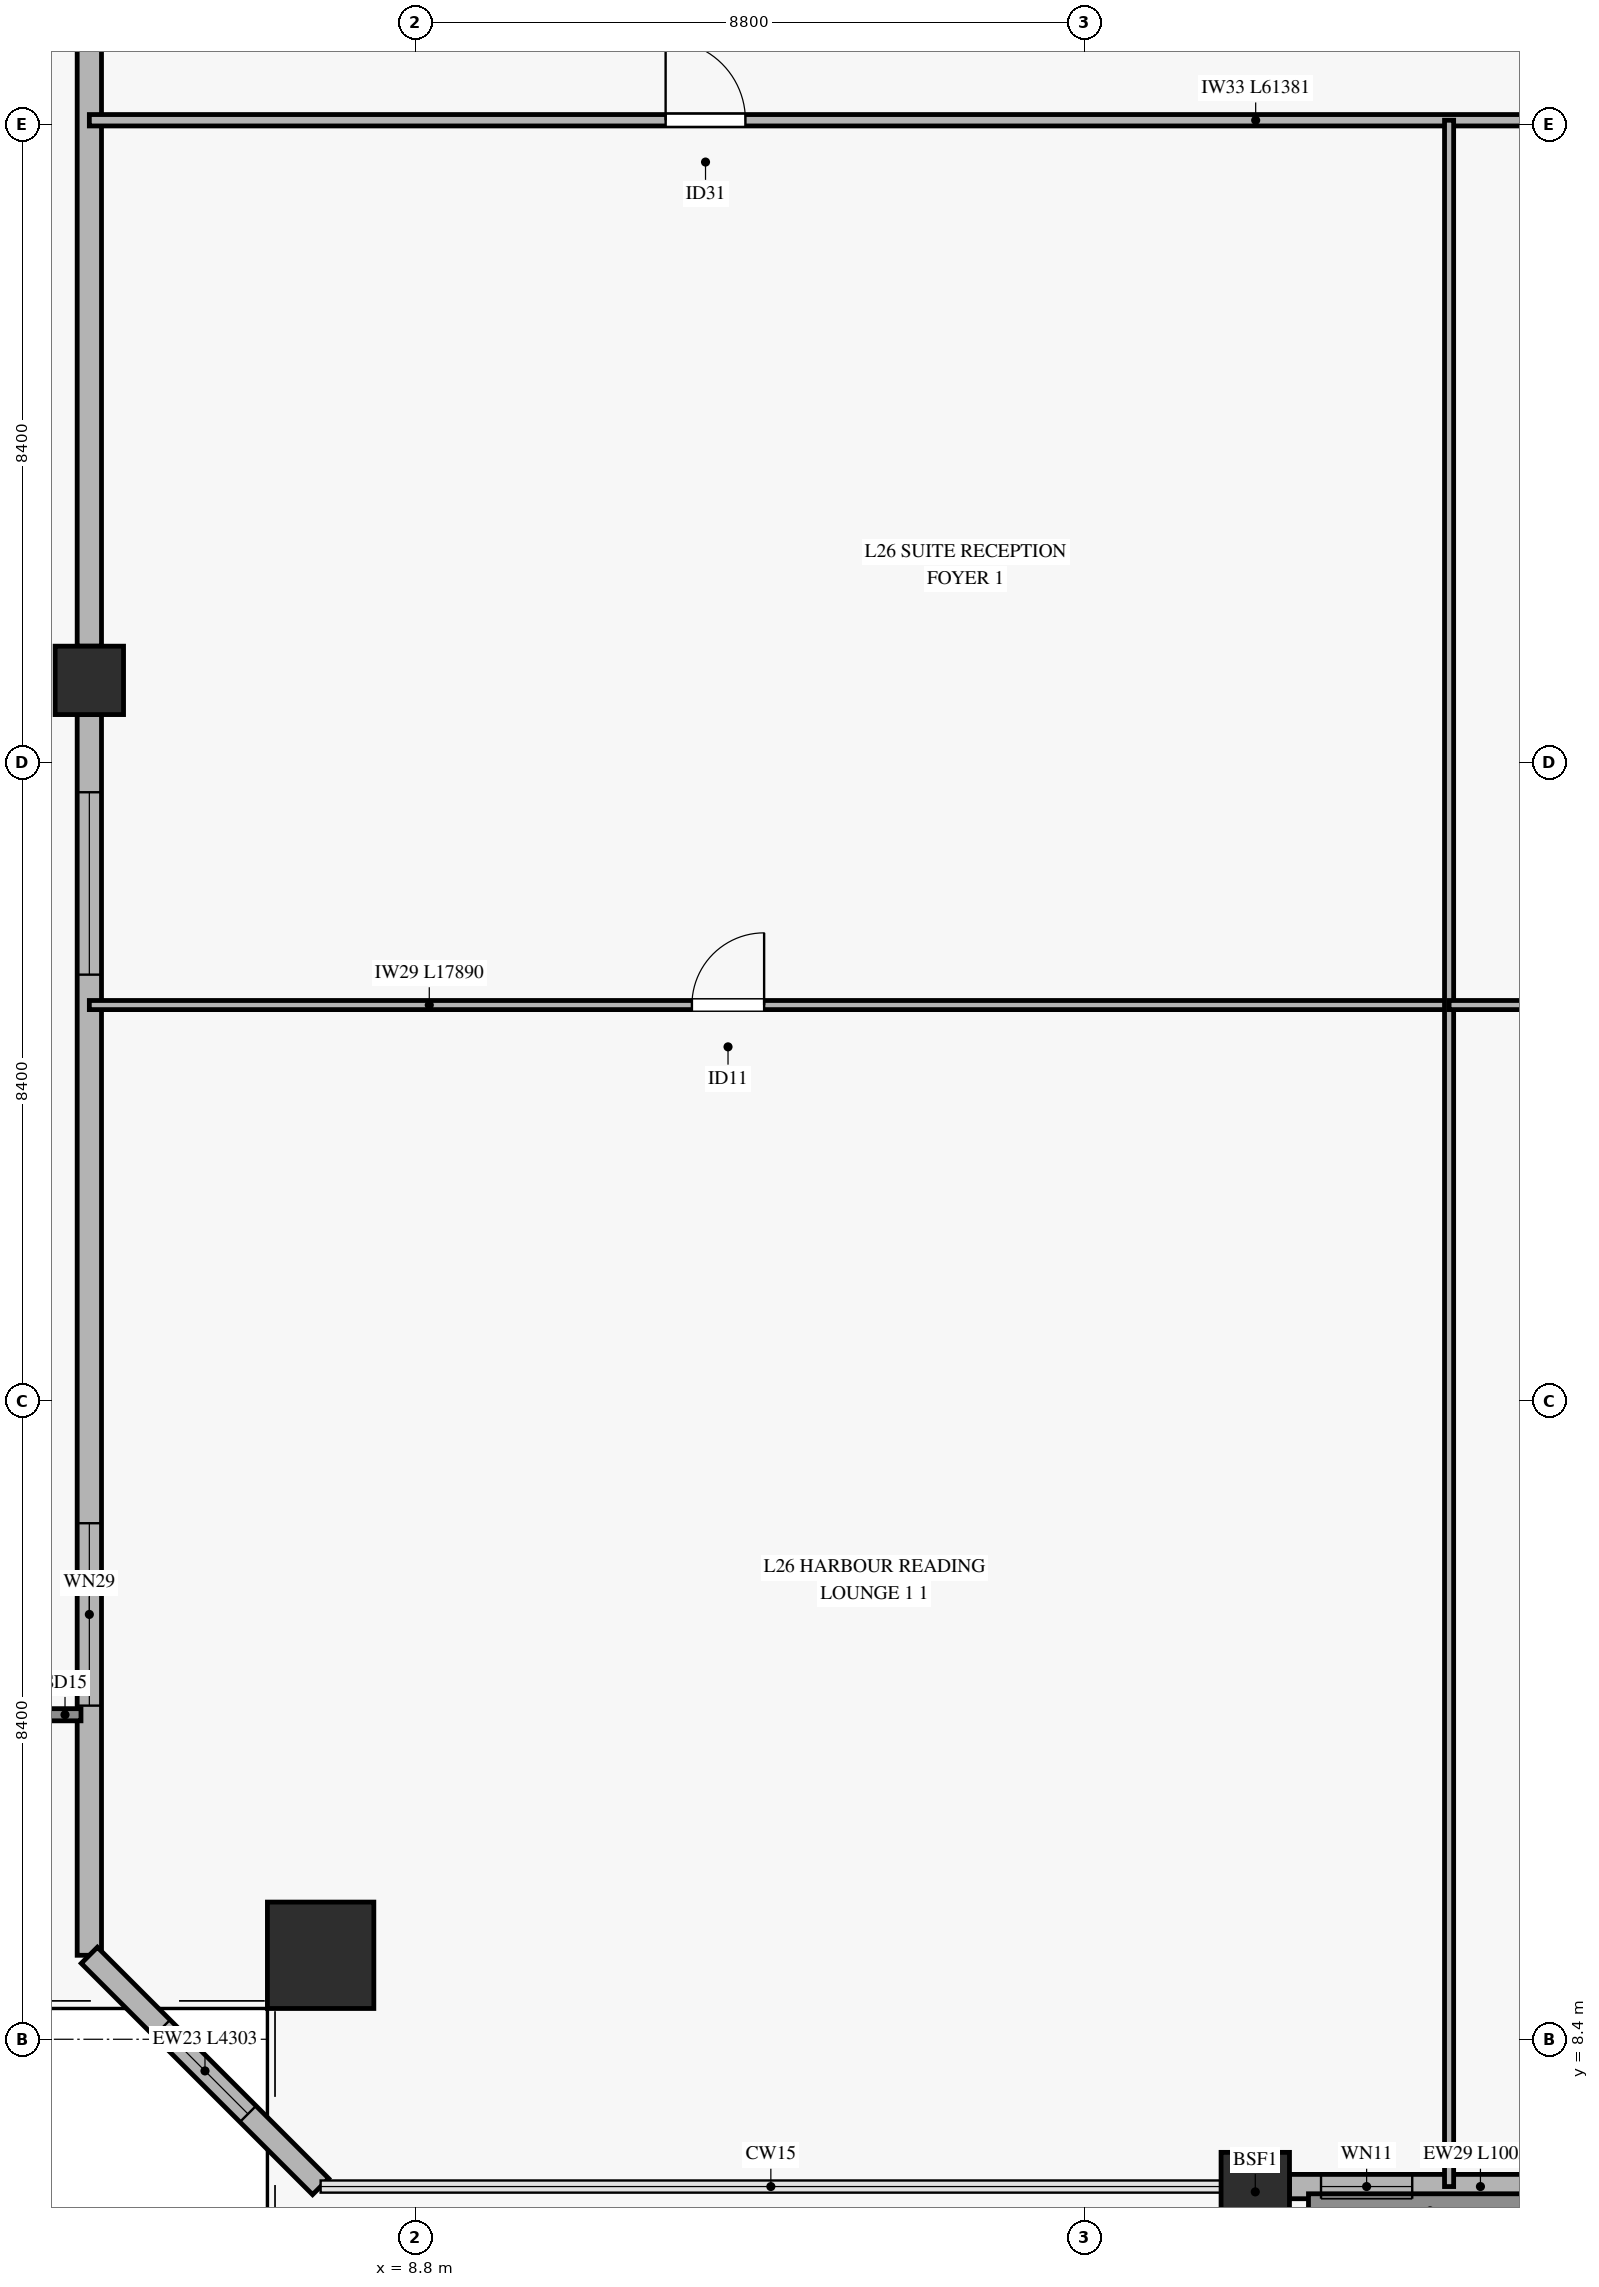
"""IFC4 building model, lengths in metres.
Left out: names, types, materials, properties, quantities, classifications, styles, units other than length and angle.
Written with IfcOpenShell. Run it as: python <this file> out.ifc"""

import sys

from ifc_helpers import new_model, si_unit, direction, frame, frame_2d, origin, origin_2d, place, context, subcontext, project, spatial, rectangle, hollow_rectangle, extrude, source, transform, mapped, element, fill, save


model = new_model("IFC4")
c1 = context("Model", 3, precision=1e-05, world=origin(), true_north=direction((0.0, 1.0)))
c2 = subcontext(c1, "Body", "Model", "MODEL_VIEW")
j1 = project(units=[si_unit("LENGTHUNIT", "METRE"), si_unit("PLANEANGLEUNIT", "RADIAN")], contexts=[c1])
p1 = place(None, origin())
s1 = spatial("IfcSite", under=j1, at=p1, CompositionType="ELEMENT")
p2 = place(p1, origin())
s2 = spatial("IfcBuilding", under=s1, at=p2, CompositionType="ELEMENT")
p3 = place(p2, frame((0.0, 0.0, 107.5)))
s3 = spatial("IfcBuildingStorey", under=s2, at=p3, CompositionType="ELEMENT", Elevation=107.5)
m1 = source(origin(), c2, "Body", "SweptSolid", [
    extrude(hollow_rectangle(XDim=1.4, YDim=1.4, WallThickness=0.065, at=origin_2d()), origin(), (0.0, 0.0, 1.0), 3.72),
])
p4 = place(p3, frame((7.553, 9.505, 0.0), z_axis=(0.055918167309, 0.135004307693, 0.989265887145), x_axis=(-0.923885455133, 0.382669133579, 0.0)))
e1 = element("IfcColumn", 1, at=p4, inside=s3, PredefinedType="COLUMN", context=c2, shape_type="MappedRepresentation", body=[
    mapped(m1, transform((0.0, 0.0, 0.0), x_axis=(1.0, 0.0, 0.0), y_axis=(0.0, 1.0, 0.0), z_axis=(0.0, 0.0, 1.0), scale=1.0)),
])
m2 = source(origin(), c2, "Body", "SweptSolid", [
    extrude(hollow_rectangle(XDim=0.9, YDim=0.9, WallThickness=0.04, at=origin_2d()), origin(), (0.0, 0.0, 1.0), 3.718),
])
p5 = place(p3, frame((19.85, 6.462, 0.0), z_axis=(0.0, 0.142046516587, 0.989859983596), x_axis=(-1.0, 0.0, 0.0)))
e2 = element("IfcColumn", 2, at=p5, inside=s3, PredefinedType="COLUMN", context=c2, shape_type="MappedRepresentation", body=[
    mapped(m2, transform((0.0, 0.0, 0.0), x_axis=(1.0, 0.0, 0.0), y_axis=(0.0, 1.0, 0.0), z_axis=(0.0, 0.0, 1.0), scale=1.0)),
])
m3 = source(origin(), c2, "Body", "SweptSolid", [
    extrude(hollow_rectangle(XDim=0.9, YDim=0.9, WallThickness=0.04, at=origin_2d()), origin(), (0.0, 0.0, 1.0), 3.697),
])
p6 = place(p3, frame((4.51, 26.28, 0.0), z_axis=(0.063266331231, 0.07165341272, 0.995421096711), x_axis=(-0.749616029369, 0.661872954964, 0.0)))
e3 = element("IfcColumn", 3, at=p6, inside=s3, PredefinedType="COLUMN", context=c2, shape_type="MappedRepresentation", body=[
    mapped(m3, transform((0.0, 0.0, 0.0), x_axis=(1.0, 0.0, 0.0), y_axis=(0.0, 1.0, 0.0), z_axis=(0.0, 0.0, 1.0), scale=1.0)),
])
p7 = place(p3, frame((20.3, 6.462, 0.0), z_axis=(0.0, 0.0, 1.0), x_axis=(1.0, 0.0, 0.0)))
e4 = element("IfcWall", 4, at=p7, inside=s3, PredefinedType="SOLIDWALL", context=c2, shape_type="SweptSolid", body=[
    extrude(rectangle(XDim=10.05, YDim=0.32, at=frame_2d((5.025, 0.0))), origin(), (0.0, 0.0, 1.0), 3.16),
])
p8 = place(p7, frame((4.1, 0.0, 0.0)))
e5 = element("IfcOpeningElement", 5, at=p8, cuts=e4, PredefinedType="OPENING", context=c2, shape_type="SweptSolid", body=[
    extrude(rectangle(XDim=1.8, YDim=2.25, at=frame_2d((0.9, 1.125))), frame((0.0, 0.17, 0.0), z_axis=(0.0, -1.0, 0.0), x_axis=(1.0, 0.0, 0.0)), (0.0, 0.0, 1.0), 0.34),
])
p9 = place(p7, frame((0.415, 0.0, 0.45)))
e6 = element("IfcOpeningElement", 6, at=p9, cuts=e4, PredefinedType="OPENING", context=c2, shape_type="SweptSolid", body=[
    extrude(rectangle(XDim=1.2, YDim=2.0, at=frame_2d((0.6, 1.0))), frame((0.0, 0.17, 0.0), z_axis=(0.0, -1.0, 0.0), x_axis=(1.0, 0.0, 0.0)), (0.0, 0.0, 1.0), 0.34),
])
p10 = place(p7, frame((6.9, 0.0, 0.45)))
e7 = element("IfcOpeningElement", 7, at=p10, cuts=e4, PredefinedType="OPENING", context=c2, shape_type="SweptSolid", body=[
    extrude(rectangle(XDim=1.6, YDim=2.0, at=frame_2d((0.8, 1.0))), frame((0.0, 0.17, 0.0), z_axis=(0.0, -1.0, 0.0), x_axis=(1.0, 0.0, 0.0)), (0.0, 0.0, 1.0), 0.34),
])
p11 = place(p3, frame((4.51, 9.505, 0.0), z_axis=(0.0, 0.0, 1.0), x_axis=(0.0, 1.0, 0.0)))
e8 = element("IfcWall", 8, at=p11, inside=s3, PredefinedType="SOLIDWALL", context=c2, shape_type="SweptSolid", body=[
    extrude(rectangle(XDim=16.325, YDim=0.32, at=frame_2d((8.163, 0.0))), origin(), (0.0, 0.0, 1.0), 3.16),
])
p12 = place(p11, frame((3.285, 0.0, 0.45)))
e9 = element("IfcOpeningElement", 9, at=p12, cuts=e8, PredefinedType="OPENING", context=c2, shape_type="SweptSolid", body=[
    extrude(rectangle(XDim=2.4, YDim=2.1, at=frame_2d((1.2, 1.05))), frame((0.0, 0.17, 0.0), z_axis=(0.0, -1.0, 0.0), x_axis=(1.0, 0.0, 0.0)), (0.0, 0.0, 1.0), 0.34),
])
p13 = place(p11, frame((12.903, 0.0, 0.45)))
e10 = element("IfcOpeningElement", 10, at=p13, cuts=e8, PredefinedType="OPENING", context=c2, shape_type="SweptSolid", body=[
    extrude(rectangle(XDim=2.4, YDim=2.1, at=frame_2d((1.2, 1.05))), frame((0.0, 0.17, 0.0), z_axis=(0.0, -1.0, 0.0), x_axis=(1.0, 0.0, 0.0)), (0.0, 0.0, 1.0), 0.34),
])
p14 = place(p3, frame((4.51, 26.73, 0.0), z_axis=(0.0, 0.0, 1.0), x_axis=(0.0, 1.0, 0.0)))
e11 = element("IfcWall", 11, at=p14, inside=s3, PredefinedType="SOLIDWALL", context=c2, shape_type="SweptSolid", body=[
    extrude(rectangle(XDim=16.326, YDim=0.32, at=frame_2d((8.163, 0.0))), origin(), (0.0, 0.0, 1.0), 3.16),
])
p15 = place(p14, frame((11.125, 0.0, 0.45)))
e12 = element("IfcOpeningElement", 12, at=p15, cuts=e11, PredefinedType="OPENING", context=c2, shape_type="SweptSolid", body=[
    extrude(rectangle(XDim=2.4, YDim=2.1, at=frame_2d((1.2, 1.05))), frame((0.0, 0.17, 0.0), z_axis=(0.0, -1.0, 0.0), x_axis=(1.0, 0.0, 0.0)), (0.0, 0.0, 1.0), 0.34),
])
p16 = place(p3, frame((4.51, 9.505, 0.0), z_axis=(0.0, 0.0, 1.0), x_axis=(0.707106781187, -0.707106781187, 0.0)))
e13 = element("IfcWall", 13, at=p16, inside=s3, PredefinedType="SOLIDWALL", context=c2, shape_type="SweptSolid", body=[
    extrude(rectangle(XDim=4.303, YDim=0.3, at=frame_2d((2.152, 0.0))), origin(), (0.0, 0.0, 1.0), 3.16),
])
p17 = place(p16, frame((1.352, 0.0, 0.45)))
e14 = element("IfcOpeningElement", 14, at=p17, cuts=e13, PredefinedType="OPENING", context=c2, shape_type="SweptSolid", body=[
    extrude(rectangle(XDim=1.6, YDim=2.0, at=frame_2d((0.8, 1.0))), frame((0.0, 0.16, 0.0), z_axis=(0.0, -1.0, 0.0), x_axis=(1.0, 0.0, 0.0)), (0.0, 0.0, 1.0), 0.32),
])
p18 = place(p3, frame((4.51, 33.65, 0.0), z_axis=(0.0, 0.0, 1.0), x_axis=(1.0, 0.0, 0.0)))
e15 = element("IfcWall", 15, at=p18, inside=s3, PredefinedType="PARTITIONING", context=c2, shape_type="SweptSolid", body=[
    extrude(rectangle(XDim=61.381, YDim=0.15, at=frame_2d((30.69, 0.0))), origin(), (0.0, 0.0, 1.0), 2.765),
])
p19 = place(p18, frame((7.582, 0.0, 0.0)))
e16 = element("IfcOpeningElement", 16, at=p19, cuts=e15, PredefinedType="OPENING", context=c2, shape_type="SweptSolid", body=[
    extrude(rectangle(XDim=1.05, YDim=2.15, at=frame_2d((0.525, 1.075))), frame((0.0, 0.085, 0.0), z_axis=(0.0, -1.0, 0.0), x_axis=(1.0, 0.0, 0.0)), (0.0, 0.0, 1.0), 0.17),
])
p20 = place(p18, frame((20.776, 0.0, 0.0)))
e17 = element("IfcOpeningElement", 17, at=p20, cuts=e15, PredefinedType="OPENING", context=c2, shape_type="SweptSolid", body=[
    extrude(rectangle(XDim=1.05, YDim=2.15, at=frame_2d((0.525, 1.075))), frame((0.0, 0.085, 0.0), z_axis=(0.0, -1.0, 0.0), x_axis=(1.0, 0.0, 0.0)), (0.0, 0.0, 1.0), 0.17),
])
p21 = place(p18, frame((30.061, 0.0, 0.0)))
e18 = element("IfcOpeningElement", 18, at=p21, cuts=e15, PredefinedType="OPENING", context=c2, shape_type="SweptSolid", body=[
    extrude(rectangle(XDim=1.05, YDim=2.15, at=frame_2d((0.525, 1.075))), frame((0.0, 0.085, 0.0), z_axis=(0.0, -1.0, 0.0), x_axis=(1.0, 0.0, 0.0)), (0.0, 0.0, 1.0), 0.17),
])
p22 = place(p18, frame((47.272, 0.0, 0.0)))
e19 = element("IfcOpeningElement", 19, at=p22, cuts=e15, PredefinedType="OPENING", context=c2, shape_type="SweptSolid", body=[
    extrude(rectangle(XDim=1.05, YDim=2.15, at=frame_2d((0.525, 1.075))), frame((0.0, 0.085, 0.0), z_axis=(0.0, -1.0, 0.0), x_axis=(1.0, 0.0, 0.0)), (0.0, 0.0, 1.0), 0.17),
])
p23 = place(p3, frame((4.51, 22.008, 0.0), z_axis=(0.0, 0.0, 1.0), x_axis=(1.0, 0.0, 0.0)))
e20 = element("IfcWall", 20, at=p23, inside=s3, PredefinedType="PARTITIONING", context=c2, shape_type="SweptSolid", body=[
    extrude(rectangle(XDim=17.89, YDim=0.12, at=frame_2d((8.945, 0.0))), origin(), (0.0, 0.0, 1.0), 2.765),
])
p24 = place(p23, frame((7.928, 0.0, 0.0)))
e21 = element("IfcOpeningElement", 21, at=p24, cuts=e20, PredefinedType="OPENING", context=c2, shape_type="SweptSolid", body=[
    extrude(rectangle(XDim=0.95, YDim=2.1, at=frame_2d((0.475, 1.05))), frame((0.0, 0.07, 0.0), z_axis=(0.0, -1.0, 0.0), x_axis=(1.0, 0.0, 0.0)), (0.0, 0.0, 1.0), 0.14),
])
p25 = place(p3, frame((22.4, 6.462, 0.0), z_axis=(0.0, 0.0, 1.0), x_axis=(0.0, 1.0, 0.0)))
e22 = element("IfcWall", 22, at=p25, inside=s3, PredefinedType="PARTITIONING", context=c2, shape_type="SweptSolid", body=[
    extrude(rectangle(XDim=27.188, YDim=0.12, at=frame_2d((13.594, 0.0))), origin(), (0.0, 0.0, 1.0), 3.165),
])
p26 = place(p3, frame((22.4, 22.008, 0.0), z_axis=(0.0, 0.0, 1.0), x_axis=(1.0, 0.0, 0.0)))
e23 = element("IfcWall", 23, at=p26, inside=s3, PredefinedType="PARTITIONING", context=c2, shape_type="SweptSolid", body=[
    extrude(rectangle(XDim=6.8, YDim=0.12, at=frame_2d((3.4, 0.0))), origin(), (0.0, 0.0, 1.0), 3.68),
])
p27 = place(p26, frame((3.019, 0.0, 0.0)))
e24 = element("IfcOpeningElement", 24, at=p27, cuts=e23, PredefinedType="OPENING", context=c2, shape_type="SweptSolid", body=[
    extrude(rectangle(XDim=0.95, YDim=2.1, at=frame_2d((0.475, 1.05))), frame((0.0, 0.07, 0.0), z_axis=(0.0, -1.0, 0.0), x_axis=(1.0, 0.0, 0.0)), (0.0, 0.0, 1.0), 0.14),
])
m4 = source(origin(), c2, "Body", "SweptSolid", [
    extrude(rectangle(XDim=1.2, YDim=2.0, at=frame_2d((0.6, 1.0))), frame((0.0, 0.03, 0.0), z_axis=(0.0, -1.0, 0.0), x_axis=(1.0, 0.0, 0.0)), (0.0, 0.0, 1.0), 0.06),
])
p28 = place(p9, origin())
e25 = element("IfcWindow", 25, at=p28, inside=s3, PartitioningType="SINGLE_PANEL", PredefinedType="WINDOW", context=c2, shape_type="MappedRepresentation", body=[
    mapped(m4, transform((0.0, 0.0, 0.0), x_axis=(1.0, 0.0, 0.0), y_axis=(0.0, 1.0, 0.0), z_axis=(0.0, 0.0, 1.0), scale=1.0)),
])
fill(e6, e25)
m5 = source(origin(), c2, "Body", "SweptSolid", [
    extrude(rectangle(XDim=2.4, YDim=2.1, at=frame_2d((1.2, 1.05))), frame((0.0, 0.03, 0.0), z_axis=(0.0, -1.0, 0.0), x_axis=(1.0, 0.0, 0.0)), (0.0, 0.0, 1.0), 0.06),
])
p29 = place(p12, origin())
e26 = element("IfcWindow", 26, at=p29, inside=s3, PartitioningType="SINGLE_PANEL", PredefinedType="WINDOW", context=c2, shape_type="MappedRepresentation", body=[
    mapped(m5, transform((0.0, 0.0, 0.0), x_axis=(1.0, 0.0, 0.0), y_axis=(0.0, 1.0, 0.0), z_axis=(0.0, 0.0, 1.0), scale=1.0)),
])
fill(e9, e26)
p30 = place(p13, origin())
e27 = element("IfcWindow", 27, at=p30, inside=s3, PartitioningType="SINGLE_PANEL", PredefinedType="WINDOW", context=c2, shape_type="MappedRepresentation", body=[
    mapped(m5, transform((0.0, 0.0, 0.0), x_axis=(1.0, 0.0, 0.0), y_axis=(0.0, 1.0, 0.0), z_axis=(0.0, 0.0, 1.0), scale=1.0)),
])
fill(e10, e27)
m6 = source(origin(), c2, "Body", "SweptSolid", [
    extrude(rectangle(XDim=1.6, YDim=2.0, at=frame_2d((0.8, 1.0))), frame((0.0, 0.03, 0.0), z_axis=(0.0, -1.0, 0.0), x_axis=(1.0, 0.0, 0.0)), (0.0, 0.0, 1.0), 0.06),
])
p31 = place(p17, origin())
e28 = element("IfcWindow", 28, at=p31, inside=s3, PartitioningType="SINGLE_PANEL", PredefinedType="WINDOW", context=c2, shape_type="MappedRepresentation", body=[
    mapped(m6, transform((0.0, 0.0, 0.0), x_axis=(1.0, 0.0, 0.0), y_axis=(0.0, 1.0, 0.0), z_axis=(0.0, 0.0, 1.0), scale=1.0)),
])
fill(e14, e28)
m7 = source(origin(), c2, "Body", "SweptSolid", [
    extrude(rectangle(XDim=1.05, YDim=2.15, at=frame_2d((0.525, 1.075))), frame((0.0, 0.025, 0.0), z_axis=(0.0, -1.0, 0.0), x_axis=(1.0, 0.0, 0.0)), (0.0, 0.0, 1.0), 0.05),
])
p32 = place(p19, origin())
e29 = element("IfcDoor", 29, at=p32, inside=s3, OperationType="SINGLE_SWING_LEFT", PredefinedType="DOOR", context=c2, shape_type="MappedRepresentation", body=[
    mapped(m7, transform((0.0, 0.0, 0.0), x_axis=(1.0, 0.0, 0.0), y_axis=(0.0, 1.0, 0.0), z_axis=(0.0, 0.0, 1.0), scale=1.0)),
])
fill(e16, e29)
m8 = source(origin(), c2, "Body", "SweptSolid", [
    extrude(rectangle(XDim=0.95, YDim=2.1, at=frame_2d((0.475, 1.05))), frame((0.0, 0.025, 0.0), z_axis=(0.0, -1.0, 0.0), x_axis=(1.0, 0.0, 0.0)), (0.0, 0.0, 1.0), 0.05),
])
p33 = place(p24, origin())
e30 = element("IfcDoor", 30, at=p33, inside=s3, OperationType="SINGLE_SWING_RIGHT", PredefinedType="DOOR", context=c2, shape_type="MappedRepresentation", body=[
    mapped(m8, transform((0.0, 0.0, 0.0), x_axis=(1.0, 0.0, 0.0), y_axis=(0.0, 1.0, 0.0), z_axis=(0.0, 0.0, 1.0), scale=1.0)),
])
fill(e21, e30)
save(model, sys.argv[1])
